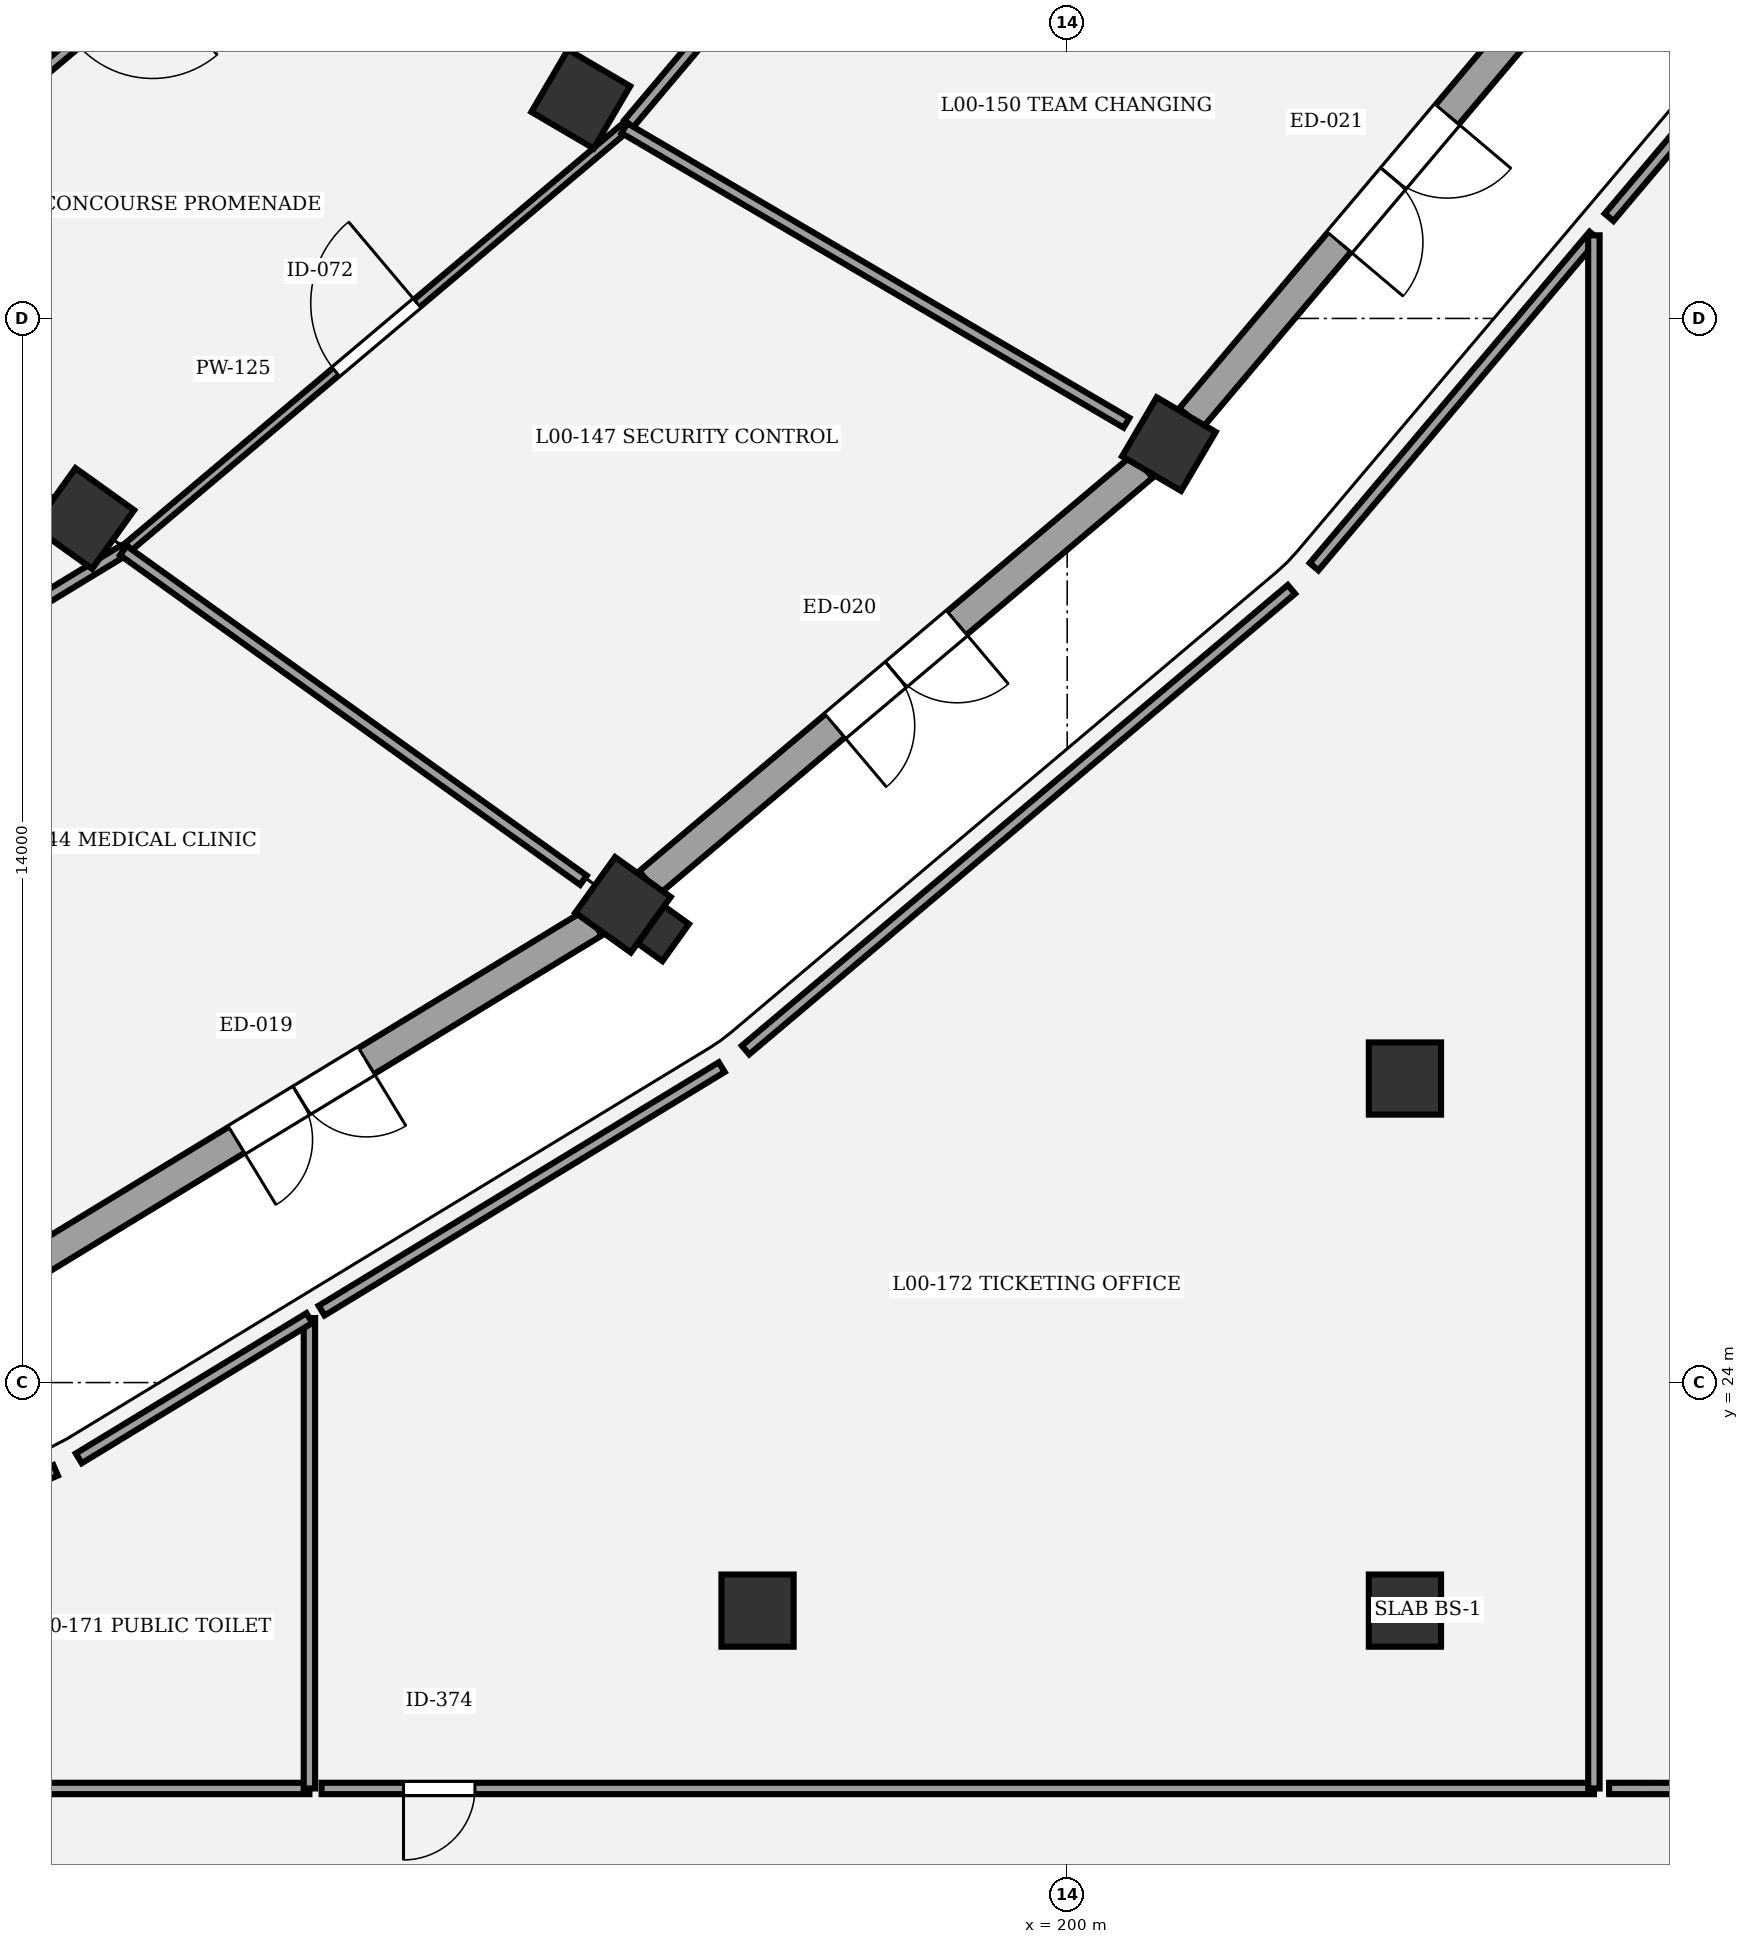
"""IFC4 building model, lengths in metres.
Left out: names, types, materials, properties, quantities, classifications, styles, units other than length and angle.
Written with IfcOpenShell. Run it as: python <this file> out.ifc"""

import sys

from ifc_helpers import new_model, si_unit, direction, frame, frame_2d, origin, origin_2d, place, context, subcontext, project, spatial, rectangle, circle, extrude, element, fill, save


model = new_model("IFC4")
c1 = context("Model", 3, precision=1e-05, world=origin(), true_north=direction((0.0, 1.0)))
c2 = subcontext(c1, "Body", "Model", "MODEL_VIEW")
j1 = project(units=[si_unit("LENGTHUNIT", "METRE"), si_unit("PLANEANGLEUNIT", "RADIAN")], contexts=[c1])
p1 = place(None, origin())
s1 = spatial("IfcSite", under=j1, at=p1, CompositionType="ELEMENT")
p2 = place(p1, origin())
s2 = spatial("IfcBuilding", under=s1, at=p2, CompositionType="ELEMENT")
p3 = place(p2, origin())
s3 = spatial("IfcBuildingStorey", under=s2, at=p3, CompositionType="ELEMENT", Elevation=0.0)
p4 = place(p3, frame((187.061, 35.368, 0.0), z_axis=(0.0, 0.0, 1.0), x_axis=(0.812897512265, -0.582406760395, 0.0)))
e1 = element("IfcColumn", 1, at=p4, inside=s3, PredefinedType="COLUMN", context=c2, shape_type="SweptSolid", body=[
    extrude(rectangle(XDim=0.95, YDim=0.95, at=origin_2d()), origin(), (0.0, 0.0, 1.0), 5.4),
])
p5 = place(p3, frame((194.156, 30.285, 0.0), z_axis=(0.0, 0.0, 1.0), x_axis=(0.812897512265, -0.582406760395, 0.0)))
e2 = element("IfcColumn", 2, at=p5, inside=s3, PredefinedType="COLUMN", context=c2, shape_type="SweptSolid", body=[
    extrude(rectangle(XDim=0.9, YDim=0.9, at=origin_2d()), origin(), (0.0, 0.0, 1.0), 5.4),
])
p6 = place(p3, frame((194.686, 29.905, 0.0), z_axis=(0.0, 0.0, 1.0), x_axis=(0.582406760395, 0.812897512265, 0.0)))
e3 = element("IfcColumn", 3, at=p6, inside=s3, PredefinedType="PILASTER", context=c2, shape_type="SweptSolid", body=[
    extrude(rectangle(XDim=0.6, YDim=0.4, at=origin_2d()), origin(), (0.0, 0.0, 1.0), 5.4),
])
p7 = place(p3, frame((193.6, 40.886, 0.0), z_axis=(0.0, 0.0, 1.0), x_axis=(0.862513669207, -0.506033764121, 0.0)))
e4 = element("IfcColumn", 4, at=p7, inside=s3, PredefinedType="COLUMN", context=c2, shape_type="SweptSolid", body=[
    extrude(rectangle(XDim=0.95, YDim=0.95, at=origin_2d()), origin(), (0.0, 0.0, 1.0), 5.4),
])
p8 = place(p3, frame((201.338, 36.346, 0.0), z_axis=(0.0, 0.0, 1.0), x_axis=(0.862513669207, -0.506033764121, 0.0)))
e5 = element("IfcColumn", 5, at=p8, inside=s3, PredefinedType="COLUMN", context=c2, shape_type="SweptSolid", body=[
    extrude(rectangle(XDim=0.9, YDim=0.9, at=origin_2d()), origin(), (0.0, 0.0, 1.0), 5.4),
])
for number, where, z_axis, x_axis in (
    (6, (195.926, 21.0, 0.0), (0.0, 0.0, 1.0), (1.0, 0.0, 0.0)),
    (7, (204.444, 21.0, 0.0), (0.0, 0.0, 1.0), (1.0, 0.0, 0.0)),
    (8, (204.444, 28.0, 0.0), (0.0, 0.0, 1.0), (1.0, 0.0, 0.0)),
):
    element("IfcColumn", number, at=place(p3, frame(where, z_axis=z_axis, x_axis=x_axis)), inside=s3, PredefinedType="COLUMN", context=c2, shape_type="SweptSolid", body=[
        extrude(circle(Radius=0.475, at=origin_2d()), origin(), (0.0, 0.0, 1.0), 5.4),
    ])
p9 = place(p3, frame((193.773, 30.053, 0.0), z_axis=(0.0, 0.0, 1.0), x_axis=(-0.854319454423, -0.519748275413, 0.0)))
e9 = element("IfcWall", 9, at=p9, inside=s3, PredefinedType="STANDARD", context=c2, shape_type="SweptSolid", body=[
    extrude(rectangle(XDim=9.006, YDim=0.4, at=frame_2d((4.503, 0.0))), origin(), (0.0, 0.0, 1.0), 4.25),
])
p10 = place(p9, frame((3.503, 0.0, 0.0)))
e10 = element("IfcOpeningElement", 10, at=p10, cuts=e9, PredefinedType="OPENING", context=c2, shape_type="SweptSolid", body=[
    extrude(rectangle(XDim=2.0, YDim=2.4, at=frame_2d((1.0, 1.2))), frame((0.0, 0.21, 0.0), z_axis=(0.0, -1.0, 0.0), x_axis=(1.0, 0.0, 0.0)), (0.0, 0.0, 1.0), 0.42),
])
p11 = place(p3, frame((200.996, 36.058, 0.0), z_axis=(0.0, 0.0, 1.0), x_axis=(-0.764254773348, -0.644914445035, 0.0)))
e11 = element("IfcWall", 11, at=p11, inside=s3, PredefinedType="STANDARD", context=c2, shape_type="SweptSolid", body=[
    extrude(rectangle(XDim=8.502, YDim=0.4, at=frame_2d((4.251, 0.0))), origin(), (0.0, 0.0, 1.0), 4.25),
])
p12 = place(p11, frame((3.201, 0.0, 0.0)))
e12 = element("IfcOpeningElement", 12, at=p12, cuts=e11, PredefinedType="OPENING", context=c2, shape_type="SweptSolid", body=[
    extrude(rectangle(XDim=2.1, YDim=2.45, at=frame_2d((1.05, 1.225))), frame((0.0, 0.21, 0.0), z_axis=(0.0, -1.0, 0.0), x_axis=(1.0, 0.0, 0.0)), (0.0, 0.0, 1.0), 0.42),
])
p13 = place(p3, frame((206.954, 42.996, 0.0), z_axis=(0.0, 0.0, 1.0), x_axis=(-0.645194244502, -0.764018577563, 0.0)))
e13 = element("IfcWall", 13, at=p13, inside=s3, PredefinedType="STANDARD", context=c2, shape_type="SweptSolid", body=[
    extrude(rectangle(XDim=8.256, YDim=0.4, at=frame_2d((4.128, 0.0))), origin(), (0.0, 0.0, 1.0), 4.25),
])
p14 = place(p13, frame((3.028, 0.0, 0.0)))
e14 = element("IfcOpeningElement", 14, at=p14, cuts=e13, PredefinedType="OPENING", context=c2, shape_type="SweptSolid", body=[
    extrude(rectangle(XDim=2.2, YDim=2.5, at=frame_2d((1.1, 1.25))), frame((0.0, 0.21, 0.0), z_axis=(0.0, -1.0, 0.0), x_axis=(1.0, 0.0, 0.0)), (0.0, 0.0, 1.0), 0.42),
])
p15 = place(p3, frame((179.895, 30.269, 0.0), z_axis=(0.0, 0.0, 1.0), x_axis=(0.854321649351, 0.519744667554, 0.0)))
e15 = element("IfcWall", 15, at=p15, inside=s3, PredefinedType="PARTITIONING", context=c2, shape_type="SweptSolid", body=[
    extrude(rectangle(XDim=8.999, YDim=0.15, at=frame_2d((4.499, 0.0))), origin(), (0.0, 0.0, 1.0), 4.15),
])
p16 = place(p15, frame((3.869, 0.0, 0.0)))
e16 = element("IfcOpeningElement", 16, at=p16, cuts=e15, PredefinedType="OPENING", context=c2, shape_type="SweptSolid", body=[
    extrude(rectangle(XDim=1.26, YDim=2.3, at=frame_2d((0.63, 1.15))), frame((0.0, 0.085, 0.0), z_axis=(0.0, -1.0, 0.0), x_axis=(1.0, 0.0, 0.0)), (0.0, 0.0, 1.0), 0.17),
])
p17 = place(p3, frame((189.133, 43.461, 0.0), z_axis=(0.0, 0.0, 1.0), x_axis=(-0.764249122867, -0.644921141068, 0.0)))
e17 = element("IfcWall", 17, at=p17, inside=s3, PredefinedType="PARTITIONING", context=c2, shape_type="SweptSolid", body=[
    extrude(rectangle(XDim=7.99, YDim=0.15, at=frame_2d((3.995, 0.0))), origin(), (0.0, 0.0, 1.0), 4.15),
])
p18 = place(p17, frame((1.526, 0.0, 0.0)))
e18 = element("IfcOpeningElement", 18, at=p18, cuts=e17, PredefinedType="OPENING", context=c2, shape_type="SweptSolid", body=[
    extrude(rectangle(XDim=1.32, YDim=2.3, at=frame_2d((0.66, 1.15))), frame((0.0, 0.085, 0.0), z_axis=(0.0, -1.0, 0.0), x_axis=(1.0, 0.0, 0.0)), (0.0, 0.0, 1.0), 0.17),
])
p19 = place(p3, frame((187.649, 34.996, 0.0), z_axis=(0.0, 0.0, 1.0), x_axis=(0.764257572309, 0.644911128117, 0.0)))
e19 = element("IfcWall", 19, at=p19, inside=s3, PredefinedType="PARTITIONING", context=c2, shape_type="SweptSolid", body=[
    extrude(rectangle(XDim=8.539, YDim=0.125, at=frame_2d((4.269, 0.0))), origin(), (0.0, 0.0, 1.0), 4.15),
])
p20 = place(p19, frame((3.569, 0.0, 0.0)))
e20 = element("IfcOpeningElement", 20, at=p20, cuts=e19, PredefinedType="OPENING", context=c2, shape_type="SweptSolid", body=[
    extrude(rectangle(XDim=1.4, YDim=2.3, at=frame_2d((0.7, 1.15))), frame((0.0, 0.073, 0.0), z_axis=(0.0, -1.0, 0.0), x_axis=(1.0, 0.0, 0.0)), (0.0, 0.0, 1.0), 0.145),
])
p21 = place(p3, frame((194.232, 40.562, 0.0), z_axis=(0.0, 0.0, 1.0), x_axis=(0.64516519871, 0.76404310505, 0.0)))
e21 = element("IfcWall", 21, at=p21, inside=s3, PredefinedType="PARTITIONING", context=c2, shape_type="SweptSolid", body=[
    extrude(rectangle(XDim=8.313, YDim=0.15, at=frame_2d((4.157, 0.0))), origin(), (0.0, 0.0, 1.0), 4.15),
])
p22 = place(p21, frame((3.687, 0.0, 0.0)))
e22 = element("IfcOpeningElement", 22, at=p22, cuts=e21, PredefinedType="OPENING", context=c2, shape_type="SweptSolid", body=[
    extrude(rectangle(XDim=0.94, YDim=2.1, at=frame_2d((0.47, 1.05))), frame((0.0, 0.085, 0.0), z_axis=(0.0, -1.0, 0.0), x_axis=(1.0, 0.0, 0.0)), (0.0, 0.0, 1.0), 0.17),
])
p23 = place(p3, frame((190.03, 18.66, 0.0), z_axis=(0.0, 0.0, 1.0), x_axis=(-1.0, 0.0, 0.0)))
e23 = element("IfcWall", 23, at=p23, inside=s3, PredefinedType="PARTITIONING", context=c2, shape_type="SweptSolid", body=[
    extrude(rectangle(XDim=5.42, YDim=0.15, at=frame_2d((2.71, 0.0))), origin(), (0.0, 0.0, 1.0), 4.15),
])
p24 = place(p23, frame((4.006, 0.0, 0.0)))
e24 = element("IfcOpeningElement", 24, at=p24, cuts=e23, PredefinedType="OPENING", context=c2, shape_type="SweptSolid", body=[
    extrude(rectangle(XDim=0.9, YDim=2.2, at=frame_2d((0.45, 1.1))), frame((0.0, 0.085, 0.0), z_axis=(0.0, -1.0, 0.0), x_axis=(1.0, 0.0, 0.0)), (0.0, 0.0, 1.0), 0.17),
])
p25 = place(p3, frame((206.93, 18.66, 0.0), z_axis=(0.0, 0.0, 1.0), x_axis=(-1.0, 0.0, 0.0)))
e25 = element("IfcWall", 25, at=p25, inside=s3, PredefinedType="PARTITIONING", context=c2, shape_type="SweptSolid", body=[
    extrude(rectangle(XDim=16.74, YDim=0.15, at=frame_2d((8.37, 0.0))), origin(), (0.0, 0.0, 1.0), 4.15),
])
p26 = place(p25, frame((14.722, 0.0, 0.0)))
e26 = element("IfcOpeningElement", 26, at=p26, cuts=e25, PredefinedType="OPENING", context=c2, shape_type="SweptSolid", body=[
    extrude(rectangle(XDim=0.94, YDim=2.2, at=frame_2d((0.47, 1.1))), frame((0.0, 0.085, 0.0), z_axis=(0.0, -1.0, 0.0), x_axis=(1.0, 0.0, 0.0)), (0.0, 0.0, 1.0), 0.17),
])
p27 = place(p3, frame((216.531, 18.657, 0.0), z_axis=(0.0, 0.0, 1.0), x_axis=(-0.999999951445, 0.000311623544, 0.0)))
e27 = element("IfcWall", 27, at=p27, inside=s3, PredefinedType="PARTITIONING", context=c2, shape_type="SweptSolid", body=[
    extrude(rectangle(XDim=9.401, YDim=0.15, at=frame_2d((4.701, 0.0))), origin(), (0.0, 0.0, 1.0), 4.15),
])
p28 = place(p27, frame((7.132, 0.0, 0.0)))
e28 = element("IfcOpeningElement", 28, at=p28, cuts=e27, PredefinedType="OPENING", context=c2, shape_type="SweptSolid", body=[
    extrude(rectangle(XDim=1.02, YDim=2.2, at=frame_2d((0.51, 1.1))), frame((0.0, 0.085, 0.0), z_axis=(0.0, -1.0, 0.0), x_axis=(1.0, 0.0, 0.0)), (0.0, 0.0, 1.0), 0.17),
])
p29 = place(p3, frame((187.582, 34.946, 0.0), z_axis=(0.0, 0.0, 1.0), x_axis=(0.812888534941, -0.582419290342, 0.0)))
e29 = element("IfcWall", 29, at=p29, inside=s3, PredefinedType="PARTITIONING", context=c2, shape_type="SweptSolid", body=[
    extrude(rectangle(XDim=7.446, YDim=0.15, at=frame_2d((3.723, 0.0))), origin(), (0.0, 0.0, 1.0), 4.15),
])
p30 = place(p3, frame((194.175, 40.503, 0.0), z_axis=(0.0, 0.0, 1.0), x_axis=(0.862503200943, -0.506051606422, 0.0)))
e30 = element("IfcWall", 30, at=p30, inside=s3, PredefinedType="PARTITIONING", context=c2, shape_type="SweptSolid", body=[
    extrude(rectangle(XDim=7.659, YDim=0.15, at=frame_2d((3.829, 0.0))), origin(), (0.0, 0.0, 1.0), 4.15),
])
p31 = place(p3, frame((190.03, 24.849, 0.0), z_axis=(0.0, 0.0, 1.0), x_axis=(0.0, -1.0, 0.0)))
e31 = element("IfcWall", 31, at=p31, inside=s3, PredefinedType="PARTITIONING", context=c2, shape_type="SweptSolid", body=[
    extrude(rectangle(XDim=6.189, YDim=0.15, at=frame_2d((3.095, 0.0))), origin(), (0.0, 0.0, 1.0), 4.15),
])
p32 = place(p3, frame((184.61, 21.943, 0.0), z_axis=(0.0, 0.0, 1.0), x_axis=(0.917454774934, 0.397840088415, 0.0)))
e32 = element("IfcWall", 32, at=p32, inside=s3, PredefinedType="PARTITIONING", context=c2, shape_type="SweptSolid", body=[
    extrude(rectangle(XDim=2.268, YDim=0.15, at=frame_2d((1.134, 0.0))), origin(), (0.0, 0.0, 1.0), 4.15),
])
p33 = place(p3, frame((186.996, 23.003, 0.0), z_axis=(0.0, 0.0, 1.0), x_axis=(0.854335242099, 0.519722324042, 0.0)))
e33 = element("IfcWall", 33, at=p33, inside=s3, PredefinedType="PARTITIONING", context=c2, shape_type="SweptSolid", body=[
    extrude(rectangle(XDim=3.552, YDim=0.15, at=frame_2d((1.776, 0.0))), origin(), (0.0, 0.0, 1.0), 4.15),
])
p34 = place(p3, frame((195.768, 28.375, 0.0), z_axis=(0.0, 0.0, 1.0), x_axis=(0.76426547638, 0.644901761212, 0.0)))
e34 = element("IfcWall", 34, at=p34, inside=s3, PredefinedType="PARTITIONING", context=c2, shape_type="SweptSolid", body=[
    extrude(rectangle(XDim=9.398, YDim=0.15, at=frame_2d((4.699, 0.0))), origin(), (0.0, 0.0, 1.0), 4.15),
])
p35 = place(p3, frame((203.248, 34.734, 0.0), z_axis=(0.0, 0.0, 1.0), x_axis=(0.645178597855, 0.764031790484, 0.0)))
e35 = element("IfcWall", 35, at=p35, inside=s3, PredefinedType="PARTITIONING", context=c2, shape_type="SweptSolid", body=[
    extrude(rectangle(XDim=5.706, YDim=0.15, at=frame_2d((2.853, 0.0))), origin(), (0.0, 0.0, 1.0), 4.15),
])
p36 = place(p3, frame((206.93, 39.094, 0.0), z_axis=(0.0, 0.0, 1.0), x_axis=(0.0, -1.0, 0.0)))
e36 = element("IfcWall", 36, at=p36, inside=s3, PredefinedType="PARTITIONING", context=c2, shape_type="SweptSolid", body=[
    extrude(rectangle(XDim=20.434, YDim=0.15, at=frame_2d((10.217, 0.0))), origin(), (0.0, 0.0, 1.0), 4.15),
])
p37 = place(p3, frame((190.19, 24.947, 0.0), z_axis=(0.0, 0.0, 1.0), x_axis=(0.854341575167, 0.519711913411, 0.0)))
e37 = element("IfcWall", 37, at=p37, inside=s3, PredefinedType="PARTITIONING", context=c2, shape_type="SweptSolid", body=[
    extrude(rectangle(XDim=6.163, YDim=0.15, at=frame_2d((3.082, 0.0))), origin(), (0.0, 0.0, 1.0), 4.15),
])
p38 = place(p3, frame((207.13, 39.33, 0.0), z_axis=(0.0, 0.0, 1.0), x_axis=(0.64518788911, 0.764023944485, 0.0)))
e38 = element("IfcWall", 38, at=p38, inside=s3, PredefinedType="PARTITIONING", context=c2, shape_type="SweptSolid", body=[
    extrude(rectangle(XDim=3.135, YDim=0.15, at=frame_2d((1.567, 0.0))), origin(), (0.0, 0.0, 1.0), 4.15),
])
p39 = place(p10, origin())
e39 = element("IfcDoor", 39, at=p39, inside=s3, OperationType="DOUBLE_DOOR_SINGLE_SWING", PredefinedType="DOOR", context=c2, shape_type="SweptSolid", body=[
    extrude(rectangle(XDim=2.0, YDim=2.4, at=frame_2d((1.0, 1.2))), frame((0.0, 0.025, 0.0), z_axis=(0.0, -1.0, 0.0), x_axis=(1.0, 0.0, 0.0)), (0.0, 0.0, 1.0), 0.05),
])
fill(e10, e39)
p40 = place(p12, origin())
e40 = element("IfcDoor", 40, at=p40, inside=s3, OperationType="DOUBLE_DOOR_SINGLE_SWING", PredefinedType="DOOR", context=c2, shape_type="SweptSolid", body=[
    extrude(rectangle(XDim=2.1, YDim=2.45, at=frame_2d((1.05, 1.225))), frame((0.0, 0.025, 0.0), z_axis=(0.0, -1.0, 0.0), x_axis=(1.0, 0.0, 0.0)), (0.0, 0.0, 1.0), 0.05),
])
fill(e12, e40)
p41 = place(p14, origin())
e41 = element("IfcDoor", 41, at=p41, inside=s3, OperationType="DOUBLE_DOOR_SINGLE_SWING", PredefinedType="DOOR", context=c2, shape_type="SweptSolid", body=[
    extrude(rectangle(XDim=2.2, YDim=2.5, at=frame_2d((1.1, 1.25))), frame((0.0, 0.025, 0.0), z_axis=(0.0, -1.0, 0.0), x_axis=(1.0, 0.0, 0.0)), (0.0, 0.0, 1.0), 0.05),
])
fill(e14, e41)
p42 = place(p20, origin())
e42 = element("IfcDoor", 42, at=p42, inside=s3, OperationType="SINGLE_SWING_RIGHT", PredefinedType="DOOR", context=c2, shape_type="SweptSolid", body=[
    extrude(rectangle(XDim=1.4, YDim=2.3, at=frame_2d((0.7, 1.15))), frame((0.0, 0.025, 0.0), z_axis=(0.0, -1.0, 0.0), x_axis=(1.0, 0.0, 0.0)), (0.0, 0.0, 1.0), 0.05),
])
fill(e20, e42)
p43 = place(p26, origin())
e43 = element("IfcDoor", 43, at=p43, inside=s3, OperationType="SINGLE_SWING_RIGHT", PredefinedType="DOOR", context=c2, shape_type="SweptSolid", body=[
    extrude(rectangle(XDim=0.94, YDim=2.2, at=frame_2d((0.47, 1.1))), frame((0.0, 0.025, 0.0), z_axis=(0.0, -1.0, 0.0), x_axis=(1.0, 0.0, 0.0)), (0.0, 0.0, 1.0), 0.05),
])
fill(e26, e43)
save(model, sys.argv[1])
